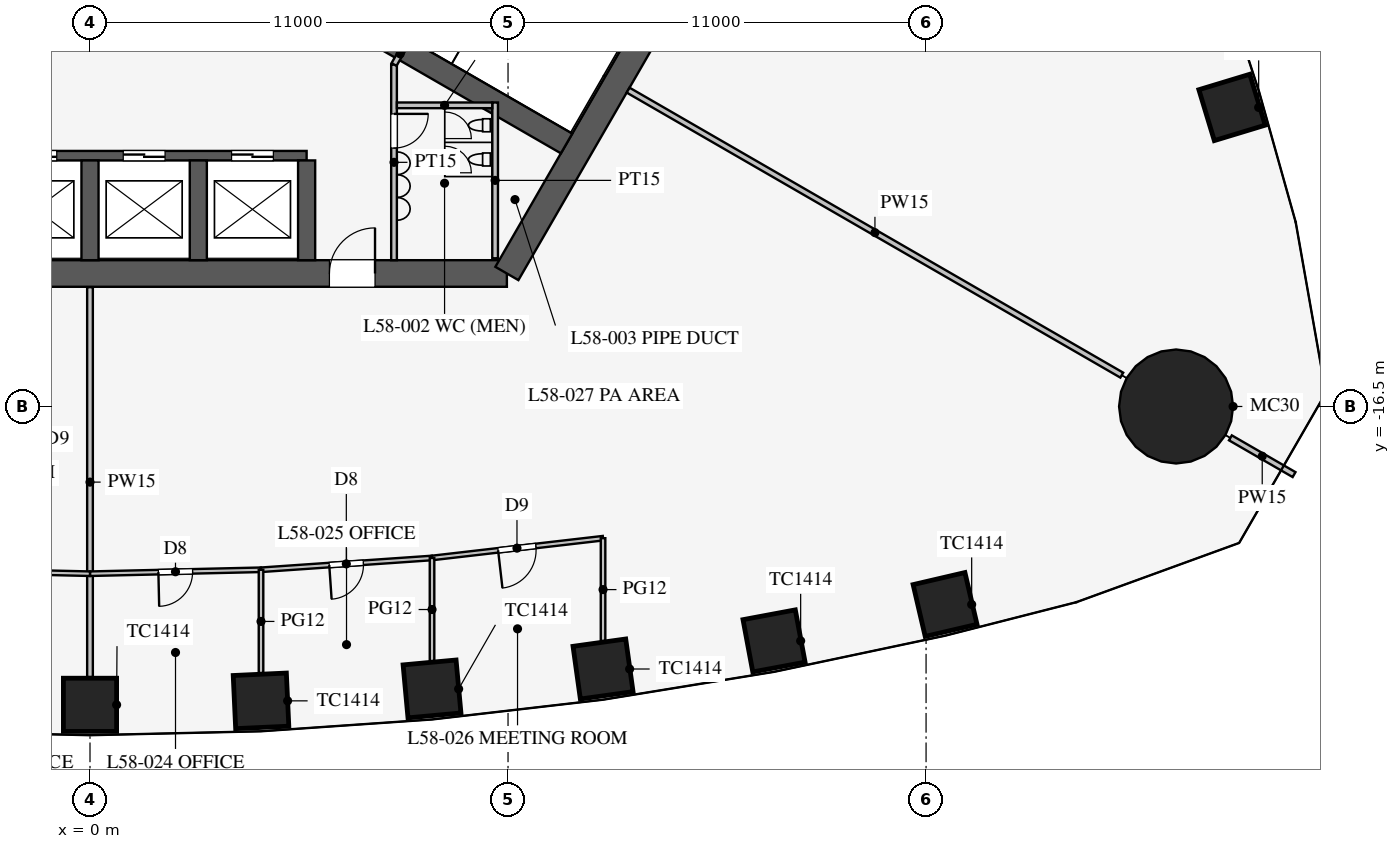
"""IFC4 building model, lengths in metres.
Left out: names, types, materials, properties, quantities, classifications, styles, units other than length and angle.
Written with IfcOpenShell. Run it as: python <this file> out.ifc"""

import sys

from ifc_helpers import new_model, si_unit, direction, frame, frame_2d, origin, origin_2d, place, context, subcontext, project, spatial, rectangle, circle, extrude, element, fill, save


model = new_model("IFC4")
c1 = context("Model", 3, precision=1e-05, world=origin(), true_north=direction((0.0, 1.0)))
c2 = subcontext(c1, "Body", "Model", "MODEL_VIEW")
j1 = project(units=[si_unit("LENGTHUNIT", "METRE"), si_unit("PLANEANGLEUNIT", "RADIAN")], contexts=[c1])
p1 = place(None, origin())
s1 = spatial("IfcSite", under=j1, at=p1, CompositionType="ELEMENT")
p2 = place(p1, origin())
s2 = spatial("IfcBuilding", under=s1, at=p2, CompositionType="ELEMENT")
p3 = place(p2, frame((0.0, 0.0, 252.7)))
s3 = spatial("IfcBuildingStorey", under=s2, at=p3, CompositionType="ELEMENT", Elevation=252.7)
for number, where, z_axis, x_axis in (
    (1, (0.0, -24.351, 0.0), (0.0, 0.0, 1.0), (1.0, 0.0, 0.0)),
    (2, (4.5, -24.246, 0.0), (0.0, 0.0, 1.0), (0.999, 0.046, 0.0)),
    (3, (9.0, -23.933, 0.0), (0.0, 0.0, 1.0), (0.996, 0.092, 0.0)),
    (4, (13.5, -23.408, 0.0), (0.0, 0.0, 1.0), (0.99, 0.138, 0.0)),
    (5, (18.0, -22.669, 0.0), (0.0, 0.0, 1.0), (0.983, 0.184, 0.0)),
    (6, (22.5, -21.71, 0.0), (0.0, 0.0, 1.0), (0.974, 0.227, 0.0)),
    (7, (30.052, -8.63, 0.0), (0.0, 0.0, 1.0), (-0.29, 0.957, 0.0)),
):
    element("IfcColumn", number, at=place(p3, frame(where, z_axis=z_axis, x_axis=x_axis)), inside=s3, PredefinedType="COLUMN", context=c2, shape_type="SweptSolid", body=[
        extrude(rectangle(XDim=1.4, YDim=1.4, at=origin_2d()), origin(), (0.0, 0.0, 1.0), 4.2),
    ])
p4 = place(p3, frame((28.579, -16.5, 0.0), z_axis=(0.0, 0.0, 1.0), x_axis=(1.0, 0.0, 0.0)))
e8 = element("IfcColumn", 8, at=p4, inside=s3, PredefinedType="COLUMN", context=c2, shape_type="SweptSolid", body=[
    extrude(circle(Radius=1.5, at=origin_2d()), origin(), (0.0, 0.0, 1.0), 4.2),
])
p5 = place(p3, frame((-10.97, -13.0, 0.0), z_axis=(0.0, 0.0, 1.0), x_axis=(1.0, 0.0, 0.0)))
e9 = element("IfcWall", 9, at=p5, inside=s3, PredefinedType="SHEAR", context=c2, shape_type="SweptSolid", body=[
    extrude(rectangle(XDim=21.939, YDim=0.7, at=frame_2d((10.97, 0.0))), origin(), (0.0, 0.0, 1.0), 4.2),
])
p6 = place(p5, frame((17.27, 0.0, 0.0)))
e10 = element("IfcOpeningElement", 10, at=p6, cuts=e9, PredefinedType="OPENING", context=c2, shape_type="SweptSolid", body=[
    extrude(rectangle(XDim=1.2, YDim=2.1, at=frame_2d((0.6, 1.05))), frame((0.0, 0.36, 0.0), z_axis=(0.0, -1.0, 0.0), x_axis=(1.0, 0.0, 0.0)), (0.0, 0.0, 1.0), 0.72),
])
p7 = place(p5, frame((3.47, 0.0, 0.0)))
e11 = element("IfcOpeningElement", 11, at=p7, cuts=e9, PredefinedType="OPENING", context=c2, shape_type="SweptSolid", body=[
    extrude(rectangle(XDim=1.2, YDim=2.1, at=frame_2d((0.6, 1.05))), frame((0.0, 0.36, 0.0), z_axis=(0.0, -1.0, 0.0), x_axis=(1.0, 0.0, 0.0)), (0.0, 0.0, 1.0), 0.72),
])
p8 = place(p3, frame((10.97, -13.0, 0.0), z_axis=(0.0, 0.0, 1.0), x_axis=(0.499995765644, 0.866027848477, 0.0)))
e12 = element("IfcWall", 12, at=p8, inside=s3, PredefinedType="SHEAR", context=c2, shape_type="SweptSolid", body=[
    extrude(rectangle(XDim=11.547, YDim=0.7, at=frame_2d((5.773, 0.0))), origin(), (0.0, 0.0, 1.0), 4.2),
])
p9 = place(p3, frame((-5.7, -9.9, 0.0), z_axis=(0.0, 0.0, 1.0), x_axis=(1.0, 0.0, 0.0)))
e13 = element("IfcWall", 13, at=p9, inside=s3, PredefinedType="SHEAR", context=c2, shape_type="SweptSolid", body=[
    extrude(rectangle(XDim=11.4, YDim=0.25, at=frame_2d((5.7, 0.0))), origin(), (0.0, 0.0, 1.0), 4.2),
])
p10 = place(p9, frame((0.875, 0.0, 0.0)))
e14 = element("IfcOpeningElement", 14, at=p10, cuts=e13, PredefinedType="OPENING", context=c2, shape_type="SweptSolid", body=[
    extrude(rectangle(XDim=1.1, YDim=2.2, at=frame_2d((0.55, 1.1))), frame((0.0, 0.135, 0.0), z_axis=(0.0, -1.0, 0.0), x_axis=(1.0, 0.0, 0.0)), (0.0, 0.0, 1.0), 0.27),
])
p11 = place(p9, frame((3.725, 0.0, 0.0)))
e15 = element("IfcOpeningElement", 15, at=p11, cuts=e13, PredefinedType="OPENING", context=c2, shape_type="SweptSolid", body=[
    extrude(rectangle(XDim=1.1, YDim=2.2, at=frame_2d((0.55, 1.1))), frame((0.0, 0.135, 0.0), z_axis=(0.0, -1.0, 0.0), x_axis=(1.0, 0.0, 0.0)), (0.0, 0.0, 1.0), 0.27),
])
p12 = place(p9, frame((6.575, 0.0, 0.0)))
e16 = element("IfcOpeningElement", 16, at=p12, cuts=e13, PredefinedType="OPENING", context=c2, shape_type="SweptSolid", body=[
    extrude(rectangle(XDim=1.1, YDim=2.2, at=frame_2d((0.55, 1.1))), frame((0.0, 0.135, 0.0), z_axis=(0.0, -1.0, 0.0), x_axis=(1.0, 0.0, 0.0)), (0.0, 0.0, 1.0), 0.27),
])
p13 = place(p9, frame((9.425, 0.0, 0.0)))
e17 = element("IfcOpeningElement", 17, at=p13, cuts=e13, PredefinedType="OPENING", context=c2, shape_type="SweptSolid", body=[
    extrude(rectangle(XDim=1.1, YDim=2.2, at=frame_2d((0.55, 1.1))), frame((0.0, 0.135, 0.0), z_axis=(0.0, -1.0, 0.0), x_axis=(1.0, 0.0, 0.0)), (0.0, 0.0, 1.0), 0.27),
])
for number, where, z_axis, x_axis in (
    (18, (0.0, -10.025, 0.0), (0.0, 0.0, 1.0), (0.0, -1.0, 0.0)),
    (19, (2.85, -10.025, 0.0), (0.0, 0.0, 1.0), (0.0, -1.0, 0.0)),
    (20, (5.7, -10.025, 0.0), (0.0, 0.0, 1.0), (0.0, -1.0, 0.0)),
):
    element("IfcWall", number, at=place(p3, frame(where, z_axis=z_axis, x_axis=x_axis)), inside=s3, PredefinedType="SHEAR", context=c2, shape_type="SweptSolid", body=[
        extrude(rectangle(XDim=2.625, YDim=0.45, at=frame_2d((1.312, 0.0))), origin(), (0.0, 0.0, 1.0), 4.2),
    ])
p14 = place(p3, frame((4.638, -5.016, 0.0), z_axis=(0.0, 0.0, 1.0), x_axis=(0.866021621257, -0.500006551472, 0.0)))
e21 = element("IfcWall", 21, at=p14, inside=s3, PredefinedType="SHEAR", context=c2, shape_type="SweptSolid", body=[
    extrude(rectangle(XDim=9.125, YDim=0.6, at=frame_2d((4.562, 0.0))), origin(), (0.0, 0.0, 1.0), 4.2),
])
p15 = place(p3, frame((8.0, -7.5, 0.0), z_axis=(0.0, 0.0, 1.0), x_axis=(0.0, -1.0, 0.0)))
e22 = element("IfcWall", 22, at=p15, inside=s3, PredefinedType="PARTITIONING", context=c2, shape_type="SweptSolid", body=[
    extrude(rectangle(XDim=5.15, YDim=0.15, at=frame_2d((2.575, 0.0))), origin(), (0.0, 0.0, 1.0), 4.0),
])
p16 = place(p15, frame((1.3, 0.0, 0.0)))
e23 = element("IfcOpeningElement", 23, at=p16, cuts=e22, PredefinedType="OPENING", context=c2, shape_type="SweptSolid", body=[
    extrude(rectangle(XDim=0.9, YDim=2.1, at=frame_2d((0.45, 1.05))), frame((0.0, 0.085, 0.0), z_axis=(0.0, -1.0, 0.0), x_axis=(1.0, 0.0, 0.0)), (0.0, 0.0, 1.0), 0.17),
])
p17 = place(p3, frame((8.0, -7.5, 0.0), z_axis=(0.0, 0.0, 1.0), x_axis=(0.499842556608, 0.866116284689, 0.0)))
e24 = element("IfcWall", 24, at=p17, inside=s3, PredefinedType="PARTITIONING", context=c2, shape_type="SweptSolid", body=[
    extrude(rectangle(XDim=0.645, YDim=0.15, at=frame_2d((0.323, 0.0))), origin(), (0.0, 0.0, 1.0), 4.0),
])
p18 = place(p3, frame((10.66, -8.5, 0.0), z_axis=(0.0, 0.0, 1.0), x_axis=(0.0, -1.0, 0.0)))
e25 = element("IfcWall", 25, at=p18, inside=s3, PredefinedType="PARTITIONING", context=c2, shape_type="SweptSolid", body=[
    extrude(rectangle(XDim=4.1, YDim=0.15, at=frame_2d((2.05, 0.0))), origin(), (0.0, 0.0, 1.0), 4.0),
])
p19 = place(p3, frame((8.075, -8.575, 0.0), z_axis=(0.0, 0.0, 1.0), x_axis=(1.0, 0.0, 0.0)))
e26 = element("IfcWall", 26, at=p19, inside=s3, PredefinedType="PARTITIONING", context=c2, shape_type="SweptSolid", body=[
    extrude(rectangle(XDim=2.51, YDim=0.15, at=frame_2d((1.255, 0.0))), origin(), (0.0, 0.0, 1.0), 4.0),
])
p20 = place(p3, frame((14.159, -8.175, 0.0), z_axis=(0.0, 0.0, 1.0), x_axis=(0.866027028085, -0.499997186618, 0.0)))
e27 = element("IfcWall", 27, at=p20, inside=s3, PredefinedType="PARTITIONING", context=c2, shape_type="SweptSolid", body=[
    extrude(rectangle(XDim=15.0, YDim=0.15, at=frame_2d((7.5, 0.0))), origin(), (0.0, 0.0, 1.0), 2.4),
])
p21 = place(p3, frame((30.008, -17.325, 0.0), z_axis=(0.0, 0.0, 1.0), x_axis=(0.866013246922, -0.500021055713, 0.0)))
e28 = element("IfcWall", 28, at=p21, inside=s3, PredefinedType="PARTITIONING", context=c2, shape_type="SweptSolid", body=[
    extrude(rectangle(XDim=1.935, YDim=0.15, at=frame_2d((0.967, 0.0))), origin(), (0.0, 0.0, 1.0), 2.4),
])
p22 = place(p3, frame((0.0, -13.36, 0.0), z_axis=(0.0, 0.0, 1.0), x_axis=(0.0, -1.0, 0.0)))
e29 = element("IfcWall", 29, at=p22, inside=s3, PredefinedType="PARTITIONING", context=c2, shape_type="SweptSolid", body=[
    extrude(rectangle(XDim=10.26, YDim=0.15, at=frame_2d((5.13, 0.0))), origin(), (0.0, 0.0, 1.0), 2.992),
])
p23 = place(p3, frame((0.0, -20.901, 0.0), z_axis=(0.0, 0.0, 1.0), x_axis=(0.99973552509, 0.022997388381, 0.0)))
e30 = element("IfcWall", 30, at=p23, inside=s3, PredefinedType="PARTITIONING", context=c2, shape_type="SweptSolid", body=[
    extrude(rectangle(XDim=4.501, YDim=0.12, at=frame_2d((2.25, 0.0))), origin(), (0.0, 0.0, 1.0), 2.9),
])
p24 = place(p23, frame((1.8, 0.0, 0.15)))
e31 = element("IfcOpeningElement", 31, at=p24, cuts=e30, PredefinedType="OPENING", context=c2, shape_type="SweptSolid", body=[
    extrude(rectangle(XDim=0.9, YDim=2.1, at=frame_2d((0.45, 1.05))), frame((0.0, 0.07, 0.0), z_axis=(0.0, -1.0, 0.0), x_axis=(1.0, 0.0, 0.0)), (0.0, 0.0, 1.0), 0.14),
])
p25 = place(p3, frame((4.5, -20.797, 0.0), z_axis=(0.0, 0.0, 1.0), x_axis=(0.997623533978, 0.068900540297, 0.0)))
e32 = element("IfcWall", 32, at=p25, inside=s3, PredefinedType="PARTITIONING", context=c2, shape_type="SweptSolid", body=[
    extrude(rectangle(XDim=4.511, YDim=0.12, at=frame_2d((2.255, 0.0))), origin(), (0.0, 0.0, 1.0), 2.9),
])
p26 = place(p25, frame((1.8, 0.0, 0.15)))
e33 = element("IfcOpeningElement", 33, at=p26, cuts=e32, PredefinedType="OPENING", context=c2, shape_type="SweptSolid", body=[
    extrude(rectangle(XDim=0.9, YDim=2.1, at=frame_2d((0.45, 1.05))), frame((0.0, 0.07, 0.0), z_axis=(0.0, -1.0, 0.0), x_axis=(1.0, 0.0, 0.0)), (0.0, 0.0, 1.0), 0.14),
])
p27 = place(p3, frame((9.0, -20.486, 0.0), z_axis=(0.0, 0.0, 1.0), x_axis=(0.993382946625, 0.114849124309, 0.0)))
e34 = element("IfcWall", 34, at=p27, inside=s3, PredefinedType="PARTITIONING", context=c2, shape_type="SweptSolid", body=[
    extrude(rectangle(XDim=4.53, YDim=0.12, at=frame_2d((2.265, 0.0))), origin(), (0.0, 0.0, 1.0), 2.9),
])
p28 = place(p27, frame((1.75, 0.0, 0.15)))
e35 = element("IfcOpeningElement", 35, at=p28, cuts=e34, PredefinedType="OPENING", context=c2, shape_type="SweptSolid", body=[
    extrude(rectangle(XDim=1.0, YDim=2.1, at=frame_2d((0.5, 1.05))), frame((0.0, 0.07, 0.0), z_axis=(0.0, -1.0, 0.0), x_axis=(1.0, 0.0, 0.0)), (0.0, 0.0, 1.0), 0.14),
])
p29 = place(p3, frame((-4.5, -20.797, 0.0), z_axis=(0.0, 0.0, 1.0), x_axis=(0.99973552509, -0.022997388381, 0.0)))
e36 = element("IfcWall", 36, at=p29, inside=s3, PredefinedType="PARTITIONING", context=c2, shape_type="SweptSolid", body=[
    extrude(rectangle(XDim=4.501, YDim=0.12, at=frame_2d((2.25, 0.0))), origin(), (0.0, 0.0, 1.0), 2.9),
])
p30 = place(p29, frame((1.8, 0.0, 0.15)))
e37 = element("IfcOpeningElement", 37, at=p30, cuts=e36, PredefinedType="OPENING", context=c2, shape_type="SweptSolid", body=[
    extrude(rectangle(XDim=0.9, YDim=2.1, at=frame_2d((0.45, 1.05))), frame((0.0, 0.07, 0.0), z_axis=(0.0, -1.0, 0.0), x_axis=(1.0, 0.0, 0.0)), (0.0, 0.0, 1.0), 0.14),
])
p31 = place(p3, frame((13.5, -19.966, 0.0), z_axis=(0.0, 0.0, 1.0), x_axis=(0.0, -1.0, 0.0)))
e38 = element("IfcWall", 38, at=p31, inside=s3, PredefinedType="PARTITIONING", context=c2, shape_type="SweptSolid", body=[
    extrude(rectangle(XDim=2.705, YDim=0.12, at=frame_2d((1.353, 0.0))), origin(), (0.0, 0.0, 1.0), 2.8),
])
p32 = place(p3, frame((4.5, -20.797, 0.0), z_axis=(0.0, 0.0, 1.0), x_axis=(0.0, -1.0, 0.0)))
e39 = element("IfcWall", 39, at=p32, inside=s3, PredefinedType="PARTITIONING", context=c2, shape_type="SweptSolid", body=[
    extrude(rectangle(XDim=2.719, YDim=0.12, at=frame_2d((1.359, 0.0))), origin(), (0.0, 0.0, 1.0), 2.9),
])
p33 = place(p3, frame((9.0, -20.486, 0.0), z_axis=(0.0, 0.0, 1.0), x_axis=(0.0, -1.0, 0.0)))
e40 = element("IfcWall", 40, at=p33, inside=s3, PredefinedType="PARTITIONING", context=c2, shape_type="SweptSolid", body=[
    extrude(rectangle(XDim=2.714, YDim=0.12, at=frame_2d((1.357, 0.0))), origin(), (0.0, 0.0, 1.0), 2.9),
])
p34 = place(p16, origin())
e41 = element("IfcDoor", 41, at=p34, inside=s3, OperationType="SINGLE_SWING_LEFT", PredefinedType="DOOR", context=c2, shape_type="SweptSolid", body=[
    extrude(rectangle(XDim=0.9, YDim=2.1, at=frame_2d((0.45, 1.05))), frame((0.0, 0.025, 0.0), z_axis=(0.0, -1.0, 0.0), x_axis=(1.0, 0.0, 0.0)), (0.0, 0.0, 1.0), 0.05),
])
fill(e23, e41)
p35 = place(p6, origin())
e42 = element("IfcDoor", 42, at=p35, inside=s3, OperationType="SINGLE_SWING_RIGHT", PredefinedType="DOOR", context=c2, shape_type="SweptSolid", body=[
    extrude(rectangle(XDim=1.2, YDim=2.1, at=frame_2d((0.6, 1.05))), frame((0.0, 0.025, 0.0), z_axis=(0.0, -1.0, 0.0), x_axis=(1.0, 0.0, 0.0)), (0.0, 0.0, 1.0), 0.05),
])
fill(e10, e42)
p36 = place(p24, frame((0.9, 0.0, 0.0), z_axis=(0.0, 0.0, 1.0), x_axis=(-1.0, 0.0, 0.0)))
e43 = element("IfcDoor", 43, at=p36, inside=s3, OperationType="SINGLE_SWING_RIGHT", PredefinedType="DOOR", context=c2, shape_type="SweptSolid", body=[
    extrude(rectangle(XDim=0.9, YDim=2.1, at=frame_2d((0.45, 1.05))), frame((0.0, 0.025, 0.0), z_axis=(0.0, -1.0, 0.0), x_axis=(1.0, 0.0, 0.0)), (0.0, 0.0, 1.0), 0.05),
])
fill(e31, e43)
p37 = place(p26, frame((0.9, 0.0, 0.0), z_axis=(0.0, 0.0, 1.0), x_axis=(-1.0, 0.0, 0.0)))
e44 = element("IfcDoor", 44, at=p37, inside=s3, OperationType="SINGLE_SWING_RIGHT", PredefinedType="DOOR", context=c2, shape_type="SweptSolid", body=[
    extrude(rectangle(XDim=0.9, YDim=2.1, at=frame_2d((0.45, 1.05))), frame((0.0, 0.025, 0.0), z_axis=(0.0, -1.0, 0.0), x_axis=(1.0, 0.0, 0.0)), (0.0, 0.0, 1.0), 0.05),
])
fill(e33, e44)
p38 = place(p28, frame((1.0, 0.0, 0.0), z_axis=(0.0, 0.0, 1.0), x_axis=(-1.0, 0.0, 0.0)))
e45 = element("IfcDoor", 45, at=p38, inside=s3, OperationType="SINGLE_SWING_RIGHT", PredefinedType="DOOR", context=c2, shape_type="SweptSolid", body=[
    extrude(rectangle(XDim=1.0, YDim=2.1, at=frame_2d((0.5, 1.05))), frame((0.0, 0.025, 0.0), z_axis=(0.0, -1.0, 0.0), x_axis=(1.0, 0.0, 0.0)), (0.0, 0.0, 1.0), 0.05),
])
fill(e35, e45)
p39 = place(p11, origin())
e46 = element("IfcDoor", 46, at=p39, inside=s3, OperationType="DOUBLE_DOOR_SLIDING", PredefinedType="DOOR", context=c2, shape_type="SweptSolid", body=[
    extrude(rectangle(XDim=1.1, YDim=2.2, at=frame_2d((0.55, 1.1))), frame((0.0, 0.025, 0.0), z_axis=(0.0, -1.0, 0.0), x_axis=(1.0, 0.0, 0.0)), (0.0, 0.0, 1.0), 0.05),
])
fill(e15, e46)
p40 = place(p12, origin())
e47 = element("IfcDoor", 47, at=p40, inside=s3, OperationType="DOUBLE_DOOR_SLIDING", PredefinedType="DOOR", context=c2, shape_type="SweptSolid", body=[
    extrude(rectangle(XDim=1.1, YDim=2.2, at=frame_2d((0.55, 1.1))), frame((0.0, 0.025, 0.0), z_axis=(0.0, -1.0, 0.0), x_axis=(1.0, 0.0, 0.0)), (0.0, 0.0, 1.0), 0.05),
])
fill(e16, e47)
p41 = place(p13, origin())
e48 = element("IfcDoor", 48, at=p41, inside=s3, OperationType="DOUBLE_DOOR_SLIDING", PredefinedType="DOOR", context=c2, shape_type="SweptSolid", body=[
    extrude(rectangle(XDim=1.1, YDim=2.2, at=frame_2d((0.55, 1.1))), frame((0.0, 0.025, 0.0), z_axis=(0.0, -1.0, 0.0), x_axis=(1.0, 0.0, 0.0)), (0.0, 0.0, 1.0), 0.05),
])
fill(e17, e48)
save(model, sys.argv[1])
